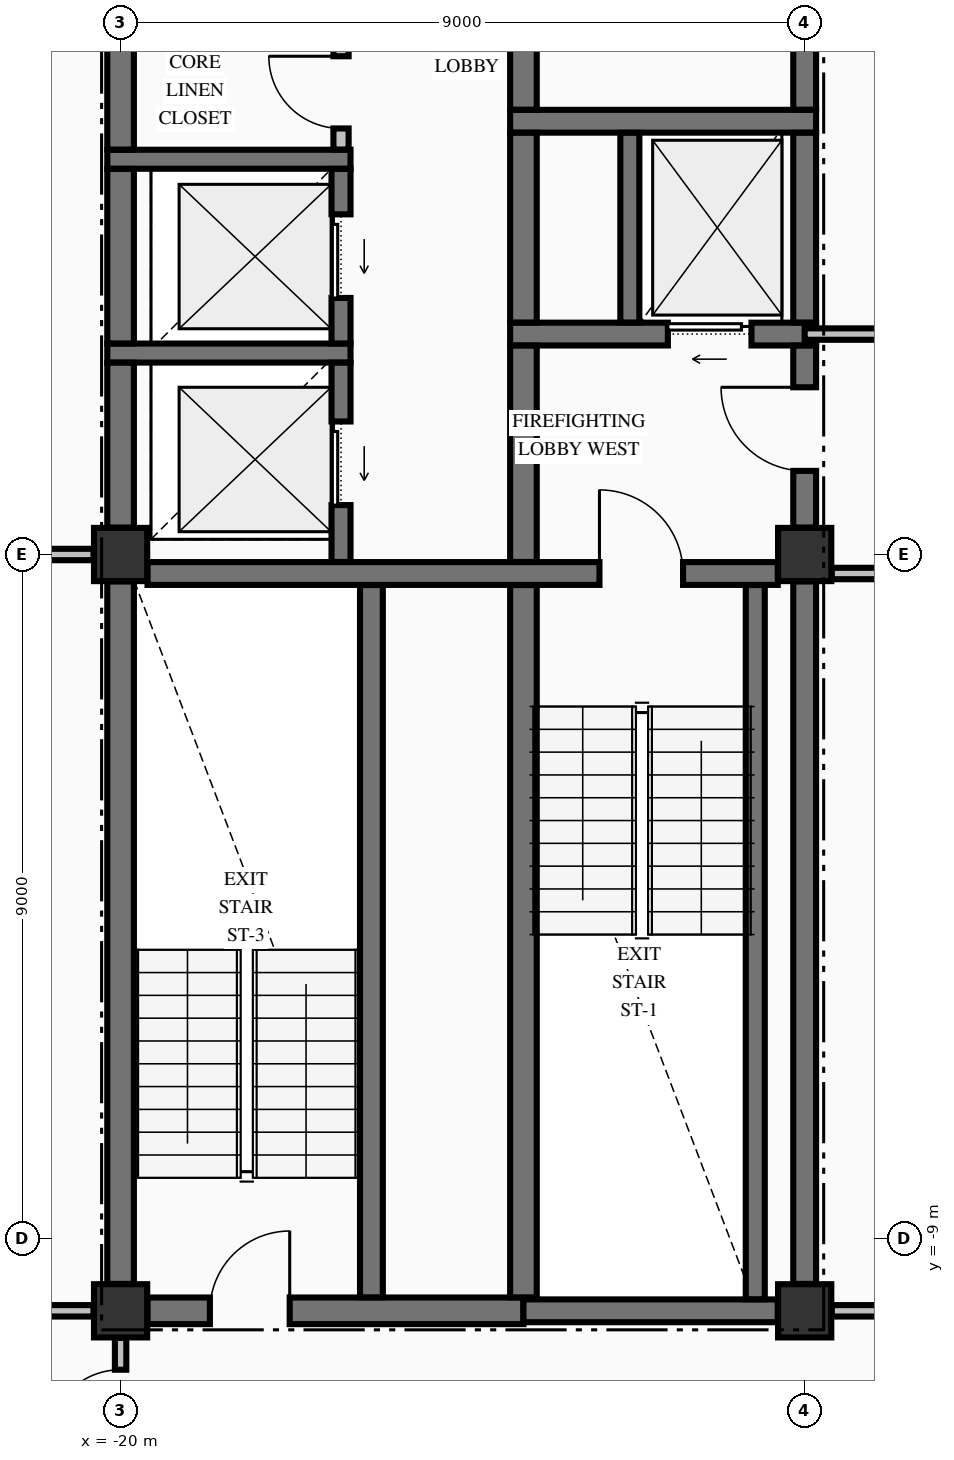
"""IFC4 building model, lengths in metres.
Left out: names, types, materials, properties, quantities, classifications, styles, units other than length and angle.
Written with IfcOpenShell. Run it as: python <this file> out.ifc"""

import sys

from ifc_helpers import new_model, si_unit, direction, frame, frame_2d, origin, origin_2d, place, context, subcontext, project, spatial, rectangle, extrude, element, fill, save


model = new_model("IFC4")
c1 = context("Model", 3, precision=1e-05, world=origin(), true_north=direction((0.0, 1.0)))
c2 = subcontext(c1, "Body", "Model", "MODEL_VIEW")
j1 = project(units=[si_unit("LENGTHUNIT", "METRE"), si_unit("PLANEANGLEUNIT", "RADIAN")], contexts=[c1])
p1 = place(None, origin())
s1 = spatial("IfcSite", under=j1, at=p1, CompositionType="ELEMENT")
p2 = place(p1, origin())
s2 = spatial("IfcBuilding", under=s1, at=p2, CompositionType="ELEMENT")
p3 = place(p2, frame((0.0, 0.0, 270.58)))
s3 = spatial("IfcBuildingStorey", under=s2, at=p3, CompositionType="ELEMENT", Elevation=270.58)
for number, where, z_axis, x_axis in (
    (1, (-20.0, -9.95, -0.325), (0.0, 0.0, 1.0), (1.0, 0.0, 0.0)),
    (2, (-11.0, -9.95, -0.325), (0.0, 0.0, 1.0), (1.0, 0.0, 0.0)),
    (3, (-11.0, 0.0, -0.325), (0.0, 0.0, 1.0), (1.0, 0.0, 0.0)),
    (4, (-20.0, 0.0, -0.325), (0.0, 0.0, 1.0), (1.0, 0.0, 0.0)),
):
    element("IfcColumn", number, at=place(p3, frame(where, z_axis=z_axis, x_axis=x_axis)), inside=s3, PredefinedType="COLUMN", context=c2, shape_type="SweptSolid", body=[
        extrude(rectangle(XDim=0.7, YDim=0.7, at=origin_2d()), origin(), (0.0, 0.0, 1.0), 3.815),
    ])
p4 = place(p3, frame((-19.646, -9.95, 0.0), z_axis=(0.0, 0.0, 1.0), x_axis=(1.0, 0.0, 0.0)))
e5 = element("IfcWall", 5, at=p4, inside=s3, PredefinedType="SHEAR", context=c2, shape_type="SweptSolid", body=[
    extrude(rectangle(XDim=4.946, YDim=0.35, at=frame_2d((2.473, 0.0))), origin(), (0.0, 0.0, 1.0), 3.49),
])
p5 = place(p4, frame((0.821, 0.0, 0.0)))
e6 = element("IfcOpeningElement", 6, at=p5, cuts=e5, PredefinedType="OPENING", context=c2, shape_type="SweptSolid", body=[
    extrude(rectangle(XDim=1.05, YDim=2.15, at=frame_2d((0.525, 1.075))), frame((0.0, 0.185, 0.0), z_axis=(0.0, -1.0, 0.0), x_axis=(1.0, 0.0, 0.0)), (0.0, 0.0, 1.0), 0.37),
])
p6 = place(p3, frame((-14.7, -9.95, 0.0), z_axis=(0.0, 0.0, 1.0), x_axis=(1.0, 0.0, 0.0)))
e7 = element("IfcWall", 7, at=p6, inside=s3, PredefinedType="SHEAR", context=c2, shape_type="SweptSolid", body=[
    extrude(rectangle(XDim=3.346, YDim=0.3, at=frame_2d((1.673, 0.0))), origin(), (0.0, 0.0, 1.0), 3.49),
])
p7 = place(p3, frame((-19.646, -0.25, 0.0), z_axis=(0.0, 0.0, 1.0), x_axis=(1.0, 0.0, 0.0)))
e8 = element("IfcWall", 8, at=p7, inside=s3, PredefinedType="SHEAR", context=c2, shape_type="SweptSolid", body=[
    extrude(rectangle(XDim=8.292, YDim=0.3, at=frame_2d((4.146, 0.0))), origin(), (0.0, 0.0, 1.0), 3.49),
])
p8 = place(p7, frame((5.946, 0.0, 0.0)))
e9 = element("IfcOpeningElement", 9, at=p8, cuts=e8, PredefinedType="OPENING", context=c2, shape_type="SweptSolid", body=[
    extrude(rectangle(XDim=1.1, YDim=2.15, at=frame_2d((0.55, 1.075))), frame((0.0, 0.16, 0.0), z_axis=(0.0, -1.0, 0.0), x_axis=(1.0, 0.0, 0.0)), (0.0, 0.0, 1.0), 0.32),
])
p9 = place(p3, frame((-20.175, 2.65, 0.0), z_axis=(0.0, 0.0, 1.0), x_axis=(1.0, 0.0, 0.0)))
e10 = element("IfcWall", 10, at=p9, inside=s3, PredefinedType="SOLIDWALL", context=c2, shape_type="SweptSolid", body=[
    extrude(rectangle(XDim=3.2, YDim=0.25, at=frame_2d((1.6, 0.0))), origin(), (0.0, 0.0, 1.0), 3.49),
])
p10 = place(p3, frame((-14.875, 2.9, 0.0), z_axis=(0.0, 0.0, 1.0), x_axis=(1.0, 0.0, 0.0)))
e11 = element("IfcWall", 11, at=p10, inside=s3, PredefinedType="SHEAR", context=c2, shape_type="SweptSolid", body=[
    extrude(rectangle(XDim=4.025, YDim=0.3, at=frame_2d((2.012, 0.0))), origin(), (0.0, 0.0, 1.0), 3.49),
])
p11 = place(p10, frame((2.075, 0.0, 0.0)))
e12 = element("IfcOpeningElement", 12, at=p11, cuts=e11, PredefinedType="OPENING", context=c2, shape_type="SweptSolid", body=[
    extrude(rectangle(XDim=1.1, YDim=2.2, at=frame_2d((0.55, 1.1))), frame((0.0, 0.16, 0.0), z_axis=(0.0, -1.0, 0.0), x_axis=(1.0, 0.0, 0.0)), (0.0, 0.0, 1.0), 0.32),
])
p12 = place(p3, frame((-20.175, 5.2, 0.0), z_axis=(0.0, 0.0, 1.0), x_axis=(1.0, 0.0, 0.0)))
e13 = element("IfcWall", 13, at=p12, inside=s3, PredefinedType="SOLIDWALL", context=c2, shape_type="SweptSolid", body=[
    extrude(rectangle(XDim=3.2, YDim=0.25, at=frame_2d((1.6, 0.0))), origin(), (0.0, 0.0, 1.0), 3.49),
])
p13 = place(p3, frame((-14.875, 5.7, 0.0), z_axis=(0.0, 0.0, 1.0), x_axis=(1.0, 0.0, 0.0)))
e14 = element("IfcWall", 14, at=p13, inside=s3, PredefinedType="SHEAR", context=c2, shape_type="SweptSolid", body=[
    extrude(rectangle(XDim=4.025, YDim=0.3, at=frame_2d((2.012, 0.0))), origin(), (0.0, 0.0, 1.0), 3.49),
])
p14 = place(p3, frame((-25.835, -9.95, 0.0), z_axis=(0.0, 0.0, 1.0), x_axis=(1.0, 0.0, 0.0)))
e15 = element("IfcWall", 15, at=p14, inside=s3, PredefinedType="PARTITIONING", context=c2, shape_type="SweptSolid", body=[
    extrude(rectangle(XDim=5.479, YDim=0.15, at=frame_2d((2.74, 0.0))), origin(), (0.0, 0.0, 1.0), 3.49),
])
p15 = place(p14, frame((2.36, 0.0, 0.0)))
e16 = element("IfcOpeningElement", 16, at=p15, cuts=e15, PredefinedType="OPENING", context=c2, shape_type="SweptSolid", body=[
    extrude(rectangle(XDim=0.95, YDim=2.15, at=frame_2d((0.475, 1.075))), frame((0.0, 0.085, 0.0), z_axis=(0.0, -1.0, 0.0), x_axis=(1.0, 0.0, 0.0)), (0.0, 0.0, 1.0), 0.17),
])
p16 = place(p3, frame((-10.644, -9.95, 0.0), z_axis=(0.0, 0.0, 1.0), x_axis=(1.0, 0.0, 0.0)))
e17 = element("IfcWall", 17, at=p16, inside=s3, PredefinedType="PARTITIONING", context=c2, shape_type="SweptSolid", body=[
    extrude(rectangle(XDim=21.288, YDim=0.15, at=frame_2d((10.644, 0.0))), origin(), (0.0, 0.0, 1.0), 3.49),
])
p17 = place(p16, frame((6.394, 0.0, 0.0)))
e18 = element("IfcOpeningElement", 18, at=p17, cuts=e17, PredefinedType="OPENING", context=c2, shape_type="SweptSolid", body=[
    extrude(rectangle(XDim=1.1, YDim=2.15, at=frame_2d((0.55, 1.075))), frame((0.0, 0.085, 0.0), z_axis=(0.0, -1.0, 0.0), x_axis=(1.0, 0.0, 0.0)), (0.0, 0.0, 1.0), 0.17),
])
p18 = place(p16, frame((13.769, 0.0, 0.0)))
e19 = element("IfcOpeningElement", 19, at=p18, cuts=e17, PredefinedType="OPENING", context=c2, shape_type="SweptSolid", body=[
    extrude(rectangle(XDim=0.95, YDim=2.15, at=frame_2d((0.475, 1.075))), frame((0.0, 0.085, 0.0), z_axis=(0.0, -1.0, 0.0), x_axis=(1.0, 0.0, 0.0)), (0.0, 0.0, 1.0), 0.17),
])
p19 = place(p16, frame((17.994, 0.0, 0.0)))
e20 = element("IfcOpeningElement", 20, at=p19, cuts=e17, PredefinedType="OPENING", context=c2, shape_type="SweptSolid", body=[
    extrude(rectangle(XDim=0.9, YDim=2.15, at=frame_2d((0.45, 1.075))), frame((0.0, 0.085, 0.0), z_axis=(0.0, -1.0, 0.0), x_axis=(1.0, 0.0, 0.0)), (0.0, 0.0, 1.0), 0.17),
])
p20 = place(p3, frame((-10.644, -0.25, 0.0), z_axis=(0.0, 0.0, 1.0), x_axis=(1.0, 0.0, 0.0)))
e21 = element("IfcWall", 21, at=p20, inside=s3, PredefinedType="PARTITIONING", context=c2, shape_type="SweptSolid", body=[
    extrude(rectangle(XDim=21.288, YDim=0.15, at=frame_2d((10.644, 0.0))), origin(), (0.0, 0.0, 1.0), 3.49),
])
p21 = place(p20, frame((6.394, 0.0, 0.0)))
e22 = element("IfcOpeningElement", 22, at=p21, cuts=e21, PredefinedType="OPENING", context=c2, shape_type="SweptSolid", body=[
    extrude(rectangle(XDim=1.1, YDim=2.15, at=frame_2d((0.55, 1.075))), frame((0.0, 0.085, 0.0), z_axis=(0.0, -1.0, 0.0), x_axis=(1.0, 0.0, 0.0)), (0.0, 0.0, 1.0), 0.17),
])
p22 = place(p20, frame((2.219, 0.0, 0.0)))
e23 = element("IfcOpeningElement", 23, at=p22, cuts=e21, PredefinedType="OPENING", context=c2, shape_type="SweptSolid", body=[
    extrude(rectangle(XDim=1.05, YDim=2.15, at=frame_2d((0.525, 1.075))), frame((0.0, 0.085, 0.0), z_axis=(0.0, -1.0, 0.0), x_axis=(1.0, 0.0, 0.0)), (0.0, 0.0, 1.0), 0.17),
])
p23 = place(p20, frame((14.369, 0.0, 0.0)))
e24 = element("IfcOpeningElement", 24, at=p23, cuts=e21, PredefinedType="OPENING", context=c2, shape_type="SweptSolid", body=[
    extrude(rectangle(XDim=0.95, YDim=2.15, at=frame_2d((0.475, 1.075))), frame((0.0, 0.085, 0.0), z_axis=(0.0, -1.0, 0.0), x_axis=(1.0, 0.0, 0.0)), (0.0, 0.0, 1.0), 0.17),
])
p24 = place(p3, frame((-25.569, 0.0, 0.0), z_axis=(0.0, 0.0, 1.0), x_axis=(1.0, 0.0, 0.0)))
e25 = element("IfcWall", 25, at=p24, inside=s3, PredefinedType="PARTITIONING", context=c2, shape_type="SweptSolid", body=[
    extrude(rectangle(XDim=5.213, YDim=0.15, at=frame_2d((2.606, 0.0))), origin(), (0.0, 0.0, 1.0), 3.08),
])
p25 = place(p3, frame((-11.0, 2.9, 0.0), z_axis=(0.0, 0.0, 1.0), x_axis=(1.0, 0.0, 0.0)))
e26 = element("IfcWall", 26, at=p25, inside=s3, PredefinedType="PARTITIONING", context=c2, shape_type="SweptSolid", body=[
    extrude(rectangle(XDim=22.0, YDim=0.15, at=frame_2d((11.0, 0.0))), origin(), (0.0, 0.0, 1.0), 3.49),
])
p26 = place(p25, frame((6.75, 0.0, 0.0)))
e27 = element("IfcOpeningElement", 27, at=p26, cuts=e26, PredefinedType="OPENING", context=c2, shape_type="SweptSolid", body=[
    extrude(rectangle(XDim=1.1, YDim=2.15, at=frame_2d((0.55, 1.075))), frame((0.0, 0.085, 0.0), z_axis=(0.0, -1.0, 0.0), x_axis=(1.0, 0.0, 0.0)), (0.0, 0.0, 1.0), 0.17),
])
p27 = place(p25, frame((2.575, 0.0, 0.0)))
e28 = element("IfcOpeningElement", 28, at=p27, cuts=e26, PredefinedType="OPENING", context=c2, shape_type="SweptSolid", body=[
    extrude(rectangle(XDim=1.05, YDim=2.15, at=frame_2d((0.525, 1.075))), frame((0.0, 0.085, 0.0), z_axis=(0.0, -1.0, 0.0), x_axis=(1.0, 0.0, 0.0)), (0.0, 0.0, 1.0), 0.17),
])
p28 = place(p25, frame((14.65, 0.0, 0.0)))
e29 = element("IfcOpeningElement", 29, at=p28, cuts=e26, PredefinedType="OPENING", context=c2, shape_type="SweptSolid", body=[
    extrude(rectangle(XDim=1.1, YDim=2.15, at=frame_2d((0.55, 1.075))), frame((0.0, 0.085, 0.0), z_axis=(0.0, -1.0, 0.0), x_axis=(1.0, 0.0, 0.0)), (0.0, 0.0, 1.0), 0.17),
])
p29 = place(p3, frame((-20.0, -9.596, 0.0), z_axis=(0.0, 0.0, 1.0), x_axis=(0.0, 1.0, 0.0)))
e30 = element("IfcWall", 30, at=p29, inside=s3, PredefinedType="SHEAR", context=c2, shape_type="SweptSolid", body=[
    extrude(rectangle(XDim=9.242, YDim=0.35, at=frame_2d((4.621, 0.0))), origin(), (0.0, 0.0, 1.0), 3.49),
])
p30 = place(p3, frame((-20.0, 0.354, 0.0), z_axis=(0.0, 0.0, 1.0), x_axis=(0.0, 1.0, 0.0)))
e31 = element("IfcWall", 31, at=p30, inside=s3, PredefinedType="SHEAR", context=c2, shape_type="SweptSolid", body=[
    extrude(rectangle(XDim=2.169, YDim=0.35, at=frame_2d((1.084, 0.0))), origin(), (0.0, 0.0, 1.0), 3.49),
])
p31 = place(p3, frame((-20.0, 2.777, 0.0), z_axis=(0.0, 0.0, 1.0), x_axis=(0.0, 1.0, 0.0)))
e32 = element("IfcWall", 32, at=p31, inside=s3, PredefinedType="SHEAR", context=c2, shape_type="SweptSolid", body=[
    extrude(rectangle(XDim=2.296, YDim=0.35, at=frame_2d((1.148, 0.0))), origin(), (0.0, 0.0, 1.0), 3.49),
])
p32 = place(p3, frame((-20.0, 5.327, 0.0), z_axis=(0.0, 0.0, 1.0), x_axis=(0.0, 1.0, 0.0)))
e33 = element("IfcWall", 33, at=p32, inside=s3, PredefinedType="SHEAR", context=c2, shape_type="SweptSolid", body=[
    extrude(rectangle(XDim=4.819, YDim=0.35, at=frame_2d((2.41, 0.0))), origin(), (0.0, 0.0, 1.0), 3.49),
])
p33 = place(p3, frame((-17.1, -0.098, 0.0), z_axis=(0.0, 0.0, 1.0), x_axis=(0.0, 1.0, 0.0)))
e34 = element("IfcWall", 34, at=p33, inside=s3, PredefinedType="SOLIDWALL", context=c2, shape_type="SweptSolid", body=[
    extrude(rectangle(XDim=2.621, YDim=0.25, at=frame_2d((1.311, 0.0))), origin(), (0.0, 0.0, 1.0), 3.49),
])
p34 = place(p33, frame((0.748, 0.0, 0.0)))
e35 = element("IfcOpeningElement", 35, at=p34, cuts=e34, PredefinedType="OPENING", context=c2, shape_type="SweptSolid", body=[
    extrude(rectangle(XDim=1.1, YDim=2.2, at=frame_2d((0.55, 1.1))), frame((0.0, 0.135, 0.0), z_axis=(0.0, -1.0, 0.0), x_axis=(1.0, 0.0, 0.0)), (0.0, 0.0, 1.0), 0.27),
])
p35 = place(p3, frame((-17.1, 2.777, 0.0), z_axis=(0.0, 0.0, 1.0), x_axis=(0.0, 1.0, 0.0)))
e36 = element("IfcWall", 36, at=p35, inside=s3, PredefinedType="SOLIDWALL", context=c2, shape_type="SweptSolid", body=[
    extrude(rectangle(XDim=2.296, YDim=0.25, at=frame_2d((1.148, 0.0))), origin(), (0.0, 0.0, 1.0), 3.49),
])
p36 = place(p35, frame((0.598, 0.0, 0.0)))
e37 = element("IfcOpeningElement", 37, at=p36, cuts=e36, PredefinedType="OPENING", context=c2, shape_type="SweptSolid", body=[
    extrude(rectangle(XDim=1.1, YDim=2.2, at=frame_2d((0.55, 1.1))), frame((0.0, 0.135, 0.0), z_axis=(0.0, -1.0, 0.0), x_axis=(1.0, 0.0, 0.0)), (0.0, 0.0, 1.0), 0.27),
])
p37 = place(p3, frame((-16.7, -9.773, 0.0), z_axis=(0.0, 0.0, 1.0), x_axis=(0.0, 1.0, 0.0)))
e38 = element("IfcWall", 38, at=p37, inside=s3, PredefinedType="SHEAR", context=c2, shape_type="SweptSolid", body=[
    extrude(rectangle(XDim=9.371, YDim=0.3, at=frame_2d((4.686, 0.0))), origin(), (0.0, 0.0, 1.0), 3.49),
])
p38 = place(p3, frame((-14.7, -9.773, 0.0), z_axis=(0.0, 0.0, 1.0), x_axis=(0.0, 1.0, 0.0)))
e39 = element("IfcWall", 39, at=p38, inside=s3, PredefinedType="SHEAR", context=c2, shape_type="SweptSolid", body=[
    extrude(rectangle(XDim=9.371, YDim=0.35, at=frame_2d((4.686, 0.0))), origin(), (0.0, 0.0, 1.0), 3.49),
])
p39 = place(p3, frame((-14.7, -0.098, 0.0), z_axis=(0.0, 0.0, 1.0), x_axis=(0.0, 1.0, 0.0)))
e40 = element("IfcWall", 40, at=p39, inside=s3, PredefinedType="SHEAR", context=c2, shape_type="SweptSolid", body=[
    extrude(rectangle(XDim=2.846, YDim=0.35, at=frame_2d((1.423, 0.0))), origin(), (0.0, 0.0, 1.0), 3.49),
])
p40 = place(p3, frame((-14.7, 3.052, 0.0), z_axis=(0.0, 0.0, 1.0), x_axis=(0.0, 1.0, 0.0)))
e41 = element("IfcWall", 41, at=p40, inside=s3, PredefinedType="SHEAR", context=c2, shape_type="SweptSolid", body=[
    extrude(rectangle(XDim=2.496, YDim=0.35, at=frame_2d((1.248, 0.0))), origin(), (0.0, 0.0, 1.0), 3.49),
])
p41 = place(p3, frame((-14.7, 5.852, 0.0), z_axis=(0.0, 0.0, 1.0), x_axis=(0.0, 1.0, 0.0)))
e42 = element("IfcWall", 42, at=p41, inside=s3, PredefinedType="SHEAR", context=c2, shape_type="SweptSolid", body=[
    extrude(rectangle(XDim=4.471, YDim=0.35, at=frame_2d((2.235, 0.0))), origin(), (0.0, 0.0, 1.0), 3.49),
])
p42 = place(p3, frame((-13.3, 3.052, 0.0), z_axis=(0.0, 0.0, 1.0), x_axis=(0.0, 1.0, 0.0)))
e43 = element("IfcWall", 43, at=p42, inside=s3, PredefinedType="SOLIDWALL", context=c2, shape_type="SweptSolid", body=[
    extrude(rectangle(XDim=2.496, YDim=0.25, at=frame_2d((1.248, 0.0))), origin(), (0.0, 0.0, 1.0), 3.49),
])
p43 = place(p3, frame((-11.65, -9.798, 0.0), z_axis=(0.0, 0.0, 1.0), x_axis=(0.0, 1.0, 0.0)))
e44 = element("IfcWall", 44, at=p43, inside=s3, PredefinedType="SOLIDWALL", context=c2, shape_type="SweptSolid", body=[
    extrude(rectangle(XDim=9.396, YDim=0.25, at=frame_2d((4.698, 0.0))), origin(), (0.0, 0.0, 1.0), 3.49),
])
p44 = place(p3, frame((-11.0, -9.596, 0.0), z_axis=(0.0, 0.0, 1.0), x_axis=(0.0, 1.0, 0.0)))
e45 = element("IfcWall", 45, at=p44, inside=s3, PredefinedType="SHEAR", context=c2, shape_type="SweptSolid", body=[
    extrude(rectangle(XDim=9.242, YDim=0.3, at=frame_2d((4.621, 0.0))), origin(), (0.0, 0.0, 1.0), 3.49),
])
p45 = place(p3, frame((-11.0, 0.354, 0.0), z_axis=(0.0, 0.0, 1.0), x_axis=(0.0, 1.0, 0.0)))
e46 = element("IfcWall", 46, at=p45, inside=s3, PredefinedType="SHEAR", context=c2, shape_type="SweptSolid", body=[
    extrude(rectangle(XDim=2.394, YDim=0.3, at=frame_2d((1.197, 0.0))), origin(), (0.0, 0.0, 1.0), 3.49),
])
p46 = place(p45, frame((0.746, 0.0, 0.0)))
e47 = element("IfcOpeningElement", 47, at=p46, cuts=e46, PredefinedType="OPENING", context=c2, shape_type="SweptSolid", body=[
    extrude(rectangle(XDim=1.1, YDim=2.15, at=frame_2d((0.55, 1.075))), frame((0.0, 0.16, 0.0), z_axis=(0.0, -1.0, 0.0), x_axis=(1.0, 0.0, 0.0)), (0.0, 0.0, 1.0), 0.32),
])
p47 = place(p3, frame((-11.0, 3.052, 0.0), z_axis=(0.0, 0.0, 1.0), x_axis=(0.0, 1.0, 0.0)))
e48 = element("IfcWall", 48, at=p47, inside=s3, PredefinedType="SHEAR", context=c2, shape_type="SweptSolid", body=[
    extrude(rectangle(XDim=2.496, YDim=0.3, at=frame_2d((1.248, 0.0))), origin(), (0.0, 0.0, 1.0), 3.49),
])
p48 = place(p3, frame((-11.0, 5.852, 0.0), z_axis=(0.0, 0.0, 1.0), x_axis=(0.0, 1.0, 0.0)))
e49 = element("IfcWall", 49, at=p48, inside=s3, PredefinedType="SHEAR", context=c2, shape_type="SweptSolid", body=[
    extrude(rectangle(XDim=4.294, YDim=0.3, at=frame_2d((2.147, 0.0))), origin(), (0.0, 0.0, 1.0), 3.49),
])
p49 = place(p3, frame((-20.0, -12.372, 0.0), z_axis=(0.0, 0.0, 1.0), x_axis=(0.0, 1.0, 0.0)))
e50 = element("IfcWall", 50, at=p49, inside=s3, PredefinedType="PARTITIONING", context=c2, shape_type="SweptSolid", body=[
    extrude(rectangle(XDim=2.066, YDim=0.15, at=frame_2d((1.033, 0.0))), origin(), (0.0, 0.0, 1.0), 3.49),
])
p50 = place(p49, frame((0.697, 0.0, 0.0)))
e51 = element("IfcOpeningElement", 51, at=p50, cuts=e50, PredefinedType="OPENING", context=c2, shape_type="SweptSolid", body=[
    extrude(rectangle(XDim=0.95, YDim=2.15, at=frame_2d((0.475, 1.075))), frame((0.0, 0.085, 0.0), z_axis=(0.0, -1.0, 0.0), x_axis=(1.0, 0.0, 0.0)), (0.0, 0.0, 1.0), 0.17),
])
p51 = place(p3, frame((-17.1, 5.328, 0.0), z_axis=(0.0, 0.0, 1.0), x_axis=(0.0, 1.0, 0.0)))
e52 = element("IfcWall", 52, at=p51, inside=s3, PredefinedType="PARTITIONING", context=c2, shape_type="SweptSolid", body=[
    extrude(rectangle(XDim=1.544, YDim=0.2, at=frame_2d((0.772, 0.0))), origin(), (0.0, 0.0, 1.0), 3.49),
])
p52 = place(p51, frame((0.277, 0.0, 0.0)))
e53 = element("IfcOpeningElement", 53, at=p52, cuts=e52, PredefinedType="OPENING", context=c2, shape_type="SweptSolid", body=[
    extrude(rectangle(XDim=0.95, YDim=2.15, at=frame_2d((0.475, 1.075))), frame((0.0, 0.11, 0.0), z_axis=(0.0, -1.0, 0.0), x_axis=(1.0, 0.0, 0.0)), (0.0, 0.0, 1.0), 0.22),
])
p53 = place(p8, origin())
e54 = element("IfcDoor", 54, at=p53, inside=s3, OperationType="SINGLE_SWING_LEFT", PredefinedType="DOOR", context=c2, shape_type="SweptSolid", body=[
    extrude(rectangle(XDim=1.1, YDim=2.15, at=frame_2d((0.55, 1.075))), frame((0.0, 0.025, 0.0), z_axis=(0.0, -1.0, 0.0), x_axis=(1.0, 0.0, 0.0)), (0.0, 0.0, 1.0), 0.05),
])
fill(e9, e54)
p54 = place(p46, origin())
e55 = element("IfcDoor", 55, at=p54, inside=s3, OperationType="SINGLE_SWING_RIGHT", PredefinedType="DOOR", context=c2, shape_type="SweptSolid", body=[
    extrude(rectangle(XDim=1.1, YDim=2.15, at=frame_2d((0.55, 1.075))), frame((0.0, 0.025, 0.0), z_axis=(0.0, -1.0, 0.0), x_axis=(1.0, 0.0, 0.0)), (0.0, 0.0, 1.0), 0.05),
])
fill(e47, e55)
p55 = place(p11, origin())
e56 = element("IfcDoor", 56, at=p55, inside=s3, OperationType="SLIDING_TO_LEFT", PredefinedType="DOOR", context=c2, shape_type="SweptSolid", body=[
    extrude(rectangle(XDim=1.1, YDim=2.2, at=frame_2d((0.55, 1.1))), frame((0.0, 0.025, 0.0), z_axis=(0.0, -1.0, 0.0), x_axis=(1.0, 0.0, 0.0)), (0.0, 0.0, 1.0), 0.05),
])
fill(e12, e56)
p56 = place(p5, origin())
e57 = element("IfcDoor", 57, at=p56, inside=s3, OperationType="SINGLE_SWING_RIGHT", PredefinedType="DOOR", context=c2, shape_type="SweptSolid", body=[
    extrude(rectangle(XDim=1.05, YDim=2.15, at=frame_2d((0.525, 1.075))), frame((0.0, 0.025, 0.0), z_axis=(0.0, -1.0, 0.0), x_axis=(1.0, 0.0, 0.0)), (0.0, 0.0, 1.0), 0.05),
])
fill(e6, e57)
p57 = place(p34, origin())
e58 = element("IfcDoor", 58, at=p57, inside=s3, OperationType="SLIDING_TO_LEFT", PredefinedType="DOOR", context=c2, shape_type="SweptSolid", body=[
    extrude(rectangle(XDim=1.1, YDim=2.2, at=frame_2d((0.55, 1.1))), frame((0.0, 0.025, 0.0), z_axis=(0.0, -1.0, 0.0), x_axis=(1.0, 0.0, 0.0)), (0.0, 0.0, 1.0), 0.05),
])
fill(e35, e58)
p58 = place(p36, origin())
e59 = element("IfcDoor", 59, at=p58, inside=s3, OperationType="SLIDING_TO_LEFT", PredefinedType="DOOR", context=c2, shape_type="SweptSolid", body=[
    extrude(rectangle(XDim=1.1, YDim=2.2, at=frame_2d((0.55, 1.1))), frame((0.0, 0.025, 0.0), z_axis=(0.0, -1.0, 0.0), x_axis=(1.0, 0.0, 0.0)), (0.0, 0.0, 1.0), 0.05),
])
fill(e37, e59)
p59 = place(p52, origin())
e60 = element("IfcDoor", 60, at=p59, inside=s3, OperationType="SINGLE_SWING_RIGHT", PredefinedType="DOOR", context=c2, shape_type="SweptSolid", body=[
    extrude(rectangle(XDim=0.95, YDim=2.15, at=frame_2d((0.475, 1.075))), frame((0.0, 0.025, 0.0), z_axis=(0.0, -1.0, 0.0), x_axis=(1.0, 0.0, 0.0)), (0.0, 0.0, 1.0), 0.05),
])
fill(e53, e60)
p60 = place(p50, origin())
e61 = element("IfcDoor", 61, at=p60, inside=s3, OperationType="SINGLE_SWING_LEFT", PredefinedType="DOOR", context=c2, shape_type="SweptSolid", body=[
    extrude(rectangle(XDim=0.95, YDim=2.15, at=frame_2d((0.475, 1.075))), frame((0.0, 0.025, 0.0), z_axis=(0.0, -1.0, 0.0), x_axis=(1.0, 0.0, 0.0)), (0.0, 0.0, 1.0), 0.05),
])
fill(e51, e61)
save(model, sys.argv[1])
